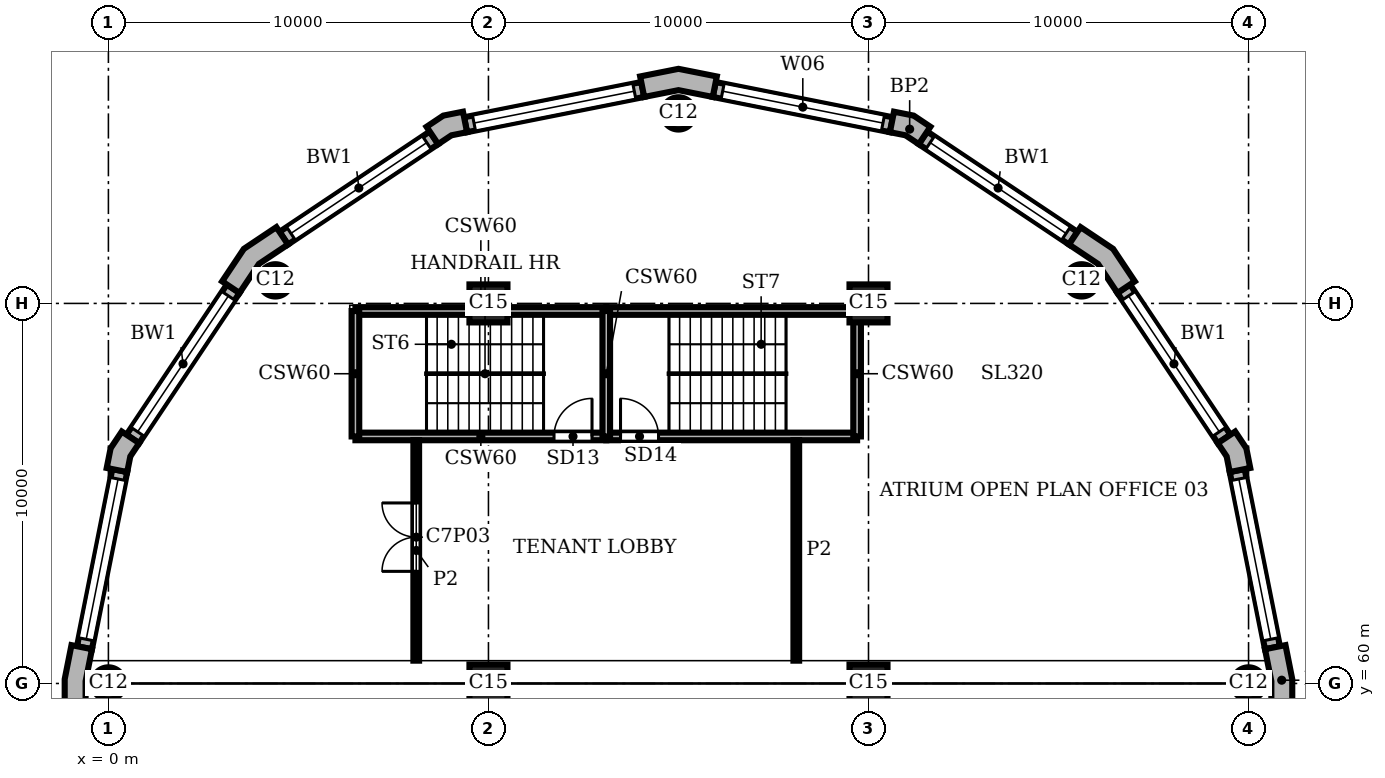
"""IFC4 building model, lengths in metres.
Left out: names, types, materials, properties, quantities, classifications, styles, units other than length and angle.
Written with IfcOpenShell. Run it as: python <this file> out.ifc"""

import sys

from ifc_helpers import new_model, si_unit, direction, frame, frame_2d, origin, origin_2d, place, context, subcontext, project, spatial, polyline, rectangle, circle, outline, extrude, element, fill, save


model = new_model("IFC4")
c1 = context("Model", 3, precision=1e-05, world=origin(), true_north=direction((0.0, 1.0)))
c2 = subcontext(c1, "Body", "Model", "MODEL_VIEW")
j1 = project(units=[si_unit("LENGTHUNIT", "METRE"), si_unit("PLANEANGLEUNIT", "RADIAN")], contexts=[c1])
p1 = place(None, origin())
s1 = spatial("IfcSite", under=j1, at=p1, CompositionType="ELEMENT")
p2 = place(p1, origin())
s2 = spatial("IfcBuilding", under=s1, at=p2, CompositionType="ELEMENT")
p3 = place(p2, frame((0.0, 0.0, 313.8)))
s3 = spatial("IfcBuildingStorey", under=s2, at=p3, CompositionType="ELEMENT", Elevation=313.8)
for number, where, z_axis, x_axis in (
    (1, (30.0, 60.0, 0.0), (0.0, 0.0, 1.0), (1.0, 0.0, 0.0)),
    (2, (25.607, 70.607, 0.0), (0.0, 0.0, 1.0), (1.0, 0.0, 0.0)),
    (3, (15.0, 75.0, 0.0), (0.0, 0.0, 1.0), (1.0, 0.0, 0.0)),
    (4, (4.393, 70.607, 0.0), (0.0, 0.0, 1.0), (1.0, 0.0, 0.0)),
    (5, (0.0, 60.0, 0.0), (0.0, 0.0, 1.0), (1.0, 0.0, 0.0)),
):
    element("IfcColumn", number, at=place(p3, frame(where, z_axis=z_axis, x_axis=x_axis)), inside=s3, PredefinedType="COLUMN", context=c2, shape_type="SweptSolid", body=[
        extrude(circle(Radius=0.425, at=origin_2d()), origin(), (0.0, 0.0, 1.0), 3.9),
    ])
for number, where, z_axis, x_axis in (
    (6, (10.0, 60.0, 0.0), (0.0, 0.0, 1.0), (1.0, 0.0, 0.0)),
    (7, (10.0, 70.0, 0.0), (0.0, 0.0, 1.0), (1.0, 0.0, 0.0)),
    (8, (20.0, 60.0, 0.0), (0.0, 0.0, 1.0), (1.0, 0.0, 0.0)),
    (9, (20.0, 70.0, 0.0), (0.0, 0.0, 1.0), (1.0, 0.0, 0.0)),
):
    element("IfcColumn", number, at=place(p3, frame(where, z_axis=z_axis, x_axis=x_axis)), inside=s3, PredefinedType="COLUMN", context=c2, shape_type="SweptSolid", body=[
        extrude(rectangle(XDim=1.0, YDim=1.0, at=origin_2d()), origin(), (0.0, 0.0, 1.0), 3.9),
    ])
p4 = place(p3, origin())
e10 = element("IfcWall", 10, at=p4, inside=s3, PredefinedType="SOLIDWALL", context=c2, shape_type="SweptSolid", body=[
    extrude(outline(polyline([(31.0, 59.2), (31.15, 59.2), (31.15, 60.113), (30.972, 61.009), (30.825, 60.98), (30.432, 60.902), (30.6, 60.059), (30.6, 59.2), (31.0, 59.2)])), origin(), (0.0, 0.0, 1.0), 3.9),
])
e11 = element("IfcWall", 11, at=p4, inside=s3, PredefinedType="SOLIDWALL", context=c2, shape_type="SweptSolid", body=[
    extrude(outline(polyline([(29.897, 65.641), (30.045, 65.67), (29.941, 66.189), (29.648, 66.629), (29.523, 66.545), (29.19, 66.323), (29.423, 65.974), (29.505, 65.563), (29.897, 65.641)])), origin(), (0.0, 0.0, 1.0), 3.9),
])
e12 = element("IfcWall", 12, at=p4, inside=s3, PredefinedType="SOLIDWALL", context=c2, shape_type="SweptSolid", body=[
    extrude(outline(polyline([(26.883, 70.497), (27.007, 70.58), (26.436, 71.436), (25.58, 72.007), (25.497, 71.883), (25.275, 71.55), (26.039, 71.039), (26.55, 70.275), (26.883, 70.497)])), origin(), (0.0, 0.0, 1.0), 3.9),
])
e13 = element("IfcWall", 13, at=p4, inside=s3, PredefinedType="SOLIDWALL", context=c2, shape_type="SweptSolid", body=[
    extrude(outline(polyline([(21.545, 74.523), (21.629, 74.648), (21.189, 74.941), (20.67, 75.045), (20.641, 74.897), (20.563, 74.505), (20.974, 74.423), (21.323, 74.19), (21.545, 74.523)])), origin(), (0.0, 0.0, 1.0), 3.9),
])
e14 = element("IfcWall", 14, at=p4, inside=s3, PredefinedType="SOLIDWALL", context=c2, shape_type="SweptSolid", body=[
    extrude(outline(polyline([(15.98, 75.825), (16.009, 75.972), (15.0, 76.173), (13.991, 75.972), (14.02, 75.825), (14.098, 75.432), (15.0, 75.612), (15.902, 75.432), (15.98, 75.825)])), origin(), (0.0, 0.0, 1.0), 3.9),
])
e15 = element("IfcWall", 15, at=p4, inside=s3, PredefinedType="SOLIDWALL", context=c2, shape_type="SweptSolid", body=[
    extrude(outline(polyline([(9.359, 74.897), (9.33, 75.045), (8.811, 74.941), (8.371, 74.648), (8.455, 74.523), (8.677, 74.19), (9.026, 74.423), (9.437, 74.505), (9.359, 74.897)])), origin(), (0.0, 0.0, 1.0), 3.9),
])
e16 = element("IfcWall", 16, at=p4, inside=s3, PredefinedType="SOLIDWALL", context=c2, shape_type="SweptSolid", body=[
    extrude(outline(polyline([(4.503, 71.883), (4.42, 72.007), (3.564, 71.436), (2.993, 70.58), (3.117, 70.497), (3.45, 70.275), (3.961, 71.039), (4.725, 71.55), (4.503, 71.883)])), origin(), (0.0, 0.0, 1.0), 3.9),
])
e17 = element("IfcWall", 17, at=p4, inside=s3, PredefinedType="SOLIDWALL", context=c2, shape_type="SweptSolid", body=[
    extrude(outline(polyline([(0.477, 66.545), (0.352, 66.629), (0.059, 66.189), (-0.045, 65.67), (0.103, 65.641), (0.495, 65.563), (0.577, 65.974), (0.81, 66.323), (0.477, 66.545)])), origin(), (0.0, 0.0, 1.0), 3.9),
])
e18 = element("IfcWall", 18, at=p4, inside=s3, PredefinedType="SOLIDWALL", context=c2, shape_type="SweptSolid", body=[
    extrude(outline(polyline([(-0.825, 60.98), (-0.972, 61.009), (-1.15, 60.113), (-1.15, 59.2), (-1.0, 59.2), (-0.6, 59.2), (-0.6, 60.059), (-0.432, 60.902), (-0.825, 60.98)])), origin(), (0.0, 0.0, 1.0), 3.9),
])
p5 = place(p3, frame((30.629, 60.941, 0.0), z_axis=(0.0, 0.0, 1.0), x_axis=(-0.195098533057, 0.98078364709, 0.0)))
e19 = element("IfcWall", 19, at=p5, inside=s3, PredefinedType="SOLIDWALL", context=c2, shape_type="SweptSolid", body=[
    extrude(rectangle(XDim=4.753, YDim=0.4, at=frame_2d((2.376, 0.0))), origin(), (0.0, 0.0, 1.0), 3.9),
])
p6 = place(p5, frame((0.226, 0.0, 0.9)))
e20 = element("IfcOpeningElement", 20, at=p6, cuts=e19, PredefinedType="OPENING", context=c2, shape_type="SweptSolid", body=[
    extrude(rectangle(XDim=4.3, YDim=2.35, at=frame_2d((2.15, 1.175))), frame((0.0, 0.21, 0.0), z_axis=(0.0, -1.0, 0.0), x_axis=(1.0, 0.0, 0.0)), (0.0, 0.0, 1.0), 0.42),
])
p7 = place(p3, frame((29.357, 66.434, 0.0), z_axis=(0.0, 0.0, 1.0), x_axis=(-0.555541552266, 0.831488775454, 0.0)))
e21 = element("IfcWall", 21, at=p7, inside=s3, PredefinedType="SOLIDWALL", context=c2, shape_type="SweptSolid", body=[
    extrude(rectangle(XDim=4.753, YDim=0.4, at=frame_2d((2.376, 0.0))), origin(), (0.0, 0.0, 1.0), 3.9),
])
p8 = place(p7, frame((0.226, 0.0, 0.9)))
e22 = element("IfcOpeningElement", 22, at=p8, cuts=e21, PredefinedType="OPENING", context=c2, shape_type="SweptSolid", body=[
    extrude(rectangle(XDim=4.3, YDim=2.35, at=frame_2d((2.15, 1.175))), frame((0.0, 0.21, 0.0), z_axis=(0.0, -1.0, 0.0), x_axis=(1.0, 0.0, 0.0)), (0.0, 0.0, 1.0), 0.42),
])
p9 = place(p3, frame((25.386, 71.716, 0.0), z_axis=(0.0, 0.0, 1.0), x_axis=(-0.831488775454, 0.555541552266, 0.0)))
e23 = element("IfcWall", 23, at=p9, inside=s3, PredefinedType="SOLIDWALL", context=c2, shape_type="SweptSolid", body=[
    extrude(rectangle(XDim=4.753, YDim=0.4, at=frame_2d((2.376, 0.0))), origin(), (0.0, 0.0, 1.0), 3.9),
])
p10 = place(p9, frame((0.226, 0.0, 0.9)))
e24 = element("IfcOpeningElement", 24, at=p10, cuts=e23, PredefinedType="OPENING", context=c2, shape_type="SweptSolid", body=[
    extrude(rectangle(XDim=4.3, YDim=2.35, at=frame_2d((2.15, 1.175))), frame((0.0, 0.21, 0.0), z_axis=(0.0, -1.0, 0.0), x_axis=(1.0, 0.0, 0.0)), (0.0, 0.0, 1.0), 0.42),
])
p11 = place(p3, frame((20.602, 74.701, 0.0), z_axis=(0.0, 0.0, 1.0), x_axis=(-0.98078364709, 0.195098533057, 0.0)))
e25 = element("IfcWall", 25, at=p11, inside=s3, PredefinedType="SOLIDWALL", context=c2, shape_type="SweptSolid", body=[
    extrude(rectangle(XDim=4.753, YDim=0.4, at=frame_2d((2.376, 0.0))), origin(), (0.0, 0.0, 1.0), 3.9),
])
p12 = place(p11, frame((0.226, 0.0, 0.9)))
e26 = element("IfcOpeningElement", 26, at=p12, cuts=e25, PredefinedType="OPENING", context=c2, shape_type="SweptSolid", body=[
    extrude(rectangle(XDim=4.3, YDim=2.35, at=frame_2d((2.15, 1.175))), frame((0.0, 0.21, 0.0), z_axis=(0.0, -1.0, 0.0), x_axis=(1.0, 0.0, 0.0)), (0.0, 0.0, 1.0), 0.42),
])
p13 = place(p3, frame((14.059, 75.629, 0.0), z_axis=(0.0, 0.0, 1.0), x_axis=(-0.98078364709, -0.195098533057, 0.0)))
e27 = element("IfcWall", 27, at=p13, inside=s3, PredefinedType="SOLIDWALL", context=c2, shape_type="SweptSolid", body=[
    extrude(rectangle(XDim=4.753, YDim=0.4, at=frame_2d((2.376, 0.0))), origin(), (0.0, 0.0, 1.0), 3.9),
])
p14 = place(p13, frame((0.226, 0.0, 0.9)))
e28 = element("IfcOpeningElement", 28, at=p14, cuts=e27, PredefinedType="OPENING", context=c2, shape_type="SweptSolid", body=[
    extrude(rectangle(XDim=4.3, YDim=2.35, at=frame_2d((2.15, 1.175))), frame((0.0, 0.21, 0.0), z_axis=(0.0, -1.0, 0.0), x_axis=(1.0, 0.0, 0.0)), (0.0, 0.0, 1.0), 0.42),
])
p15 = place(p3, frame((8.566, 74.357, 0.0), z_axis=(0.0, 0.0, 1.0), x_axis=(-0.831488775454, -0.555541552266, 0.0)))
e29 = element("IfcWall", 29, at=p15, inside=s3, PredefinedType="SOLIDWALL", context=c2, shape_type="SweptSolid", body=[
    extrude(rectangle(XDim=4.753, YDim=0.4, at=frame_2d((2.376, 0.0))), origin(), (0.0, 0.0, 1.0), 3.9),
])
p16 = place(p15, frame((0.226, 0.0, 0.9)))
e30 = element("IfcOpeningElement", 30, at=p16, cuts=e29, PredefinedType="OPENING", context=c2, shape_type="SweptSolid", body=[
    extrude(rectangle(XDim=4.3, YDim=2.35, at=frame_2d((2.15, 1.175))), frame((0.0, 0.21, 0.0), z_axis=(0.0, -1.0, 0.0), x_axis=(1.0, 0.0, 0.0)), (0.0, 0.0, 1.0), 0.42),
])
p17 = place(p3, frame((3.284, 70.386, 0.0), z_axis=(0.0, 0.0, 1.0), x_axis=(-0.555541552266, -0.831488775454, 0.0)))
e31 = element("IfcWall", 31, at=p17, inside=s3, PredefinedType="SOLIDWALL", context=c2, shape_type="SweptSolid", body=[
    extrude(rectangle(XDim=4.753, YDim=0.4, at=frame_2d((2.376, 0.0))), origin(), (0.0, 0.0, 1.0), 3.9),
])
p18 = place(p17, frame((0.226, 0.0, 0.9)))
e32 = element("IfcOpeningElement", 32, at=p18, cuts=e31, PredefinedType="OPENING", context=c2, shape_type="SweptSolid", body=[
    extrude(rectangle(XDim=4.3, YDim=2.35, at=frame_2d((2.15, 1.175))), frame((0.0, 0.21, 0.0), z_axis=(0.0, -1.0, 0.0), x_axis=(1.0, 0.0, 0.0)), (0.0, 0.0, 1.0), 0.42),
])
p19 = place(p3, frame((0.299, 65.602, 0.0), z_axis=(0.0, 0.0, 1.0), x_axis=(-0.195098533057, -0.98078364709, 0.0)))
e33 = element("IfcWall", 33, at=p19, inside=s3, PredefinedType="SOLIDWALL", context=c2, shape_type="SweptSolid", body=[
    extrude(rectangle(XDim=4.753, YDim=0.4, at=frame_2d((2.376, 0.0))), origin(), (0.0, 0.0, 1.0), 3.9),
])
p20 = place(p19, frame((0.226, 0.0, 0.9)))
e34 = element("IfcOpeningElement", 34, at=p20, cuts=e33, PredefinedType="OPENING", context=c2, shape_type="SweptSolid", body=[
    extrude(rectangle(XDim=4.3, YDim=2.35, at=frame_2d((2.15, 1.175))), frame((0.0, 0.21, 0.0), z_axis=(0.0, -1.0, 0.0), x_axis=(1.0, 0.0, 0.0)), (0.0, 0.0, 1.0), 0.42),
])
p21 = place(p3, frame((6.5, 66.5, 0.0), z_axis=(0.0, 0.0, 1.0), x_axis=(1.0, 0.0, 0.0)))
e35 = element("IfcWall", 35, at=p21, inside=s3, PredefinedType="SHEAR", context=c2, shape_type="SweptSolid", body=[
    extrude(rectangle(XDim=6.6, YDim=0.2, at=frame_2d((3.3, 0.0))), origin(), (0.0, 0.0, 1.0), 3.58),
])
p22 = place(p21, frame((5.225, 0.0, 0.0)))
e36 = element("IfcOpeningElement", 36, at=p22, cuts=e35, PredefinedType="OPENING", context=c2, shape_type="SweptSolid", body=[
    extrude(rectangle(XDim=1.0, YDim=2.1, at=frame_2d((0.5, 1.05))), frame((0.0, 0.11, 0.0), z_axis=(0.0, -1.0, 0.0), x_axis=(1.0, 0.0, 0.0)), (0.0, 0.0, 1.0), 0.22),
])
p23 = place(p3, frame((13.1, 66.5, 0.0), z_axis=(0.0, 0.0, 1.0), x_axis=(1.0, 0.0, 0.0)))
e37 = element("IfcWall", 37, at=p23, inside=s3, PredefinedType="SHEAR", context=c2, shape_type="SweptSolid", body=[
    extrude(rectangle(XDim=6.6, YDim=0.2, at=frame_2d((3.3, 0.0))), origin(), (0.0, 0.0, 1.0), 3.58),
])
p24 = place(p23, frame((0.375, 0.0, 0.0)))
e38 = element("IfcOpeningElement", 38, at=p24, cuts=e37, PredefinedType="OPENING", context=c2, shape_type="SweptSolid", body=[
    extrude(rectangle(XDim=1.0, YDim=2.1, at=frame_2d((0.5, 1.05))), frame((0.0, 0.11, 0.0), z_axis=(0.0, -1.0, 0.0), x_axis=(1.0, 0.0, 0.0)), (0.0, 0.0, 1.0), 0.22),
])
p25 = place(p3, frame((6.5, 69.8, 0.0), z_axis=(0.0, 0.0, 1.0), x_axis=(1.0, 0.0, 0.0)))
e39 = element("IfcWall", 39, at=p25, inside=s3, PredefinedType="SHEAR", context=c2, shape_type="SweptSolid", body=[
    extrude(rectangle(XDim=6.6, YDim=0.2, at=frame_2d((3.3, 0.0))), origin(), (0.0, 0.0, 1.0), 3.58),
])
p26 = place(p3, frame((13.1, 69.8, 0.0), z_axis=(0.0, 0.0, 1.0), x_axis=(1.0, 0.0, 0.0)))
e40 = element("IfcWall", 40, at=p26, inside=s3, PredefinedType="SHEAR", context=c2, shape_type="SweptSolid", body=[
    extrude(rectangle(XDim=6.6, YDim=0.2, at=frame_2d((3.3, 0.0))), origin(), (0.0, 0.0, 1.0), 3.58),
])
for number, where, z_axis, x_axis in (
    (41, (6.5, 66.5, 0.0), (0.0, 0.0, 1.0), (0.0, 1.0, 0.0)),
    (42, (13.1, 66.5, 0.0), (0.0, 0.0, 1.0), (0.0, 1.0, 0.0)),
    (43, (19.7, 66.5, 0.0), (0.0, 0.0, 1.0), (0.0, 1.0, 0.0)),
):
    element("IfcWall", number, at=place(p3, frame(where, z_axis=z_axis, x_axis=x_axis)), inside=s3, PredefinedType="SHEAR", context=c2, shape_type="SweptSolid", body=[
        extrude(rectangle(XDim=3.3, YDim=0.2, at=frame_2d((1.65, 0.0))), origin(), (0.0, 0.0, 1.0), 3.58),
    ])
p27 = place(p3, frame((8.1, 60.6, 0.0), z_axis=(0.0, 0.0, 1.0), x_axis=(0.0, 1.0, 0.0)))
e44 = element("IfcWall", 44, at=p27, inside=s3, PredefinedType="PARTITIONING", context=c2, shape_type="SweptSolid", body=[
    extrude(rectangle(XDim=5.8, YDim=0.15, at=frame_2d((2.9, 0.0))), origin(), (0.0, 0.0, 1.0), 3.58),
])
p28 = place(p27, frame((2.35, 0.0, 0.0)))
e45 = element("IfcOpeningElement", 45, at=p28, cuts=e44, PredefinedType="OPENING", context=c2, shape_type="SweptSolid", body=[
    extrude(rectangle(XDim=1.8, YDim=2.1, at=frame_2d((0.9, 1.05))), frame((0.0, 0.085, 0.0), z_axis=(0.0, -1.0, 0.0), x_axis=(1.0, 0.0, 0.0)), (0.0, 0.0, 1.0), 0.17),
])
p29 = place(p3, frame((18.1, 60.6, 0.0), z_axis=(0.0, 0.0, 1.0), x_axis=(0.0, 1.0, 0.0)))
e46 = element("IfcWall", 46, at=p29, inside=s3, PredefinedType="PARTITIONING", context=c2, shape_type="SweptSolid", body=[
    extrude(rectangle(XDim=5.8, YDim=0.15, at=frame_2d((2.9, 0.0))), origin(), (0.0, 0.0, 1.0), 3.58),
])
p30 = place(p6, origin())
e47 = element("IfcWindow", 47, at=p30, inside=s3, PartitioningType="SINGLE_PANEL", PredefinedType="WINDOW", context=c2, shape_type="SweptSolid", body=[
    extrude(rectangle(XDim=4.3, YDim=2.35, at=frame_2d((2.15, 1.175))), frame((0.0, 0.16, 0.0), z_axis=(0.0, -1.0, 0.0), x_axis=(1.0, 0.0, 0.0)), (0.0, 0.0, 1.0), 0.06),
])
fill(e20, e47)
p31 = place(p8, origin())
e48 = element("IfcWindow", 48, at=p31, inside=s3, PartitioningType="SINGLE_PANEL", PredefinedType="WINDOW", context=c2, shape_type="SweptSolid", body=[
    extrude(rectangle(XDim=4.3, YDim=2.35, at=frame_2d((2.15, 1.175))), frame((0.0, 0.16, 0.0), z_axis=(0.0, -1.0, 0.0), x_axis=(1.0, 0.0, 0.0)), (0.0, 0.0, 1.0), 0.06),
])
fill(e22, e48)
p32 = place(p10, origin())
e49 = element("IfcWindow", 49, at=p32, inside=s3, PartitioningType="SINGLE_PANEL", PredefinedType="WINDOW", context=c2, shape_type="SweptSolid", body=[
    extrude(rectangle(XDim=4.3, YDim=2.35, at=frame_2d((2.15, 1.175))), frame((0.0, 0.16, 0.0), z_axis=(0.0, -1.0, 0.0), x_axis=(1.0, 0.0, 0.0)), (0.0, 0.0, 1.0), 0.06),
])
fill(e24, e49)
p33 = place(p12, origin())
e50 = element("IfcWindow", 50, at=p33, inside=s3, PartitioningType="SINGLE_PANEL", PredefinedType="WINDOW", context=c2, shape_type="SweptSolid", body=[
    extrude(rectangle(XDim=4.3, YDim=2.35, at=frame_2d((2.15, 1.175))), frame((0.0, 0.16, 0.0), z_axis=(0.0, -1.0, 0.0), x_axis=(1.0, 0.0, 0.0)), (0.0, 0.0, 1.0), 0.06),
])
fill(e26, e50)
p34 = place(p14, origin())
e51 = element("IfcWindow", 51, at=p34, inside=s3, PartitioningType="SINGLE_PANEL", PredefinedType="WINDOW", context=c2, shape_type="SweptSolid", body=[
    extrude(rectangle(XDim=4.3, YDim=2.35, at=frame_2d((2.15, 1.175))), frame((0.0, 0.16, 0.0), z_axis=(0.0, -1.0, 0.0), x_axis=(1.0, 0.0, 0.0)), (0.0, 0.0, 1.0), 0.06),
])
fill(e28, e51)
p35 = place(p16, origin())
e52 = element("IfcWindow", 52, at=p35, inside=s3, PartitioningType="SINGLE_PANEL", PredefinedType="WINDOW", context=c2, shape_type="SweptSolid", body=[
    extrude(rectangle(XDim=4.3, YDim=2.35, at=frame_2d((2.15, 1.175))), frame((0.0, 0.16, 0.0), z_axis=(0.0, -1.0, 0.0), x_axis=(1.0, 0.0, 0.0)), (0.0, 0.0, 1.0), 0.06),
])
fill(e30, e52)
p36 = place(p18, origin())
e53 = element("IfcWindow", 53, at=p36, inside=s3, PartitioningType="SINGLE_PANEL", PredefinedType="WINDOW", context=c2, shape_type="SweptSolid", body=[
    extrude(rectangle(XDim=4.3, YDim=2.35, at=frame_2d((2.15, 1.175))), frame((0.0, 0.16, 0.0), z_axis=(0.0, -1.0, 0.0), x_axis=(1.0, 0.0, 0.0)), (0.0, 0.0, 1.0), 0.06),
])
fill(e32, e53)
p37 = place(p20, origin())
e54 = element("IfcWindow", 54, at=p37, inside=s3, PartitioningType="SINGLE_PANEL", PredefinedType="WINDOW", context=c2, shape_type="SweptSolid", body=[
    extrude(rectangle(XDim=4.3, YDim=2.35, at=frame_2d((2.15, 1.175))), frame((0.0, 0.16, 0.0), z_axis=(0.0, -1.0, 0.0), x_axis=(1.0, 0.0, 0.0)), (0.0, 0.0, 1.0), 0.06),
])
fill(e34, e54)
p38 = place(p22, origin())
e55 = element("IfcDoor", 55, at=p38, inside=s3, OperationType="SINGLE_SWING_RIGHT", PredefinedType="DOOR", context=c2, shape_type="SweptSolid", body=[
    extrude(rectangle(XDim=1.0, YDim=2.1, at=frame_2d((0.5, 1.05))), frame((0.0, 0.025, 0.0), z_axis=(0.0, -1.0, 0.0), x_axis=(1.0, 0.0, 0.0)), (0.0, 0.0, 1.0), 0.05),
])
fill(e36, e55)
p39 = place(p24, origin())
e56 = element("IfcDoor", 56, at=p39, inside=s3, OperationType="SINGLE_SWING_LEFT", PredefinedType="DOOR", context=c2, shape_type="SweptSolid", body=[
    extrude(rectangle(XDim=1.0, YDim=2.1, at=frame_2d((0.5, 1.05))), frame((0.0, 0.025, 0.0), z_axis=(0.0, -1.0, 0.0), x_axis=(1.0, 0.0, 0.0)), (0.0, 0.0, 1.0), 0.05),
])
fill(e38, e56)
p40 = place(p28, origin())
e57 = element("IfcDoor", 57, at=p40, inside=s3, OperationType="DOUBLE_DOOR_SINGLE_SWING", PredefinedType="DOOR", context=c2, shape_type="SweptSolid", body=[
    extrude(rectangle(XDim=1.8, YDim=2.1, at=frame_2d((0.9, 1.05))), frame((0.0, 0.025, 0.0), z_axis=(0.0, -1.0, 0.0), x_axis=(1.0, 0.0, 0.0)), (0.0, 0.0, 1.0), 0.05),
])
fill(e45, e57)
save(model, sys.argv[1])
